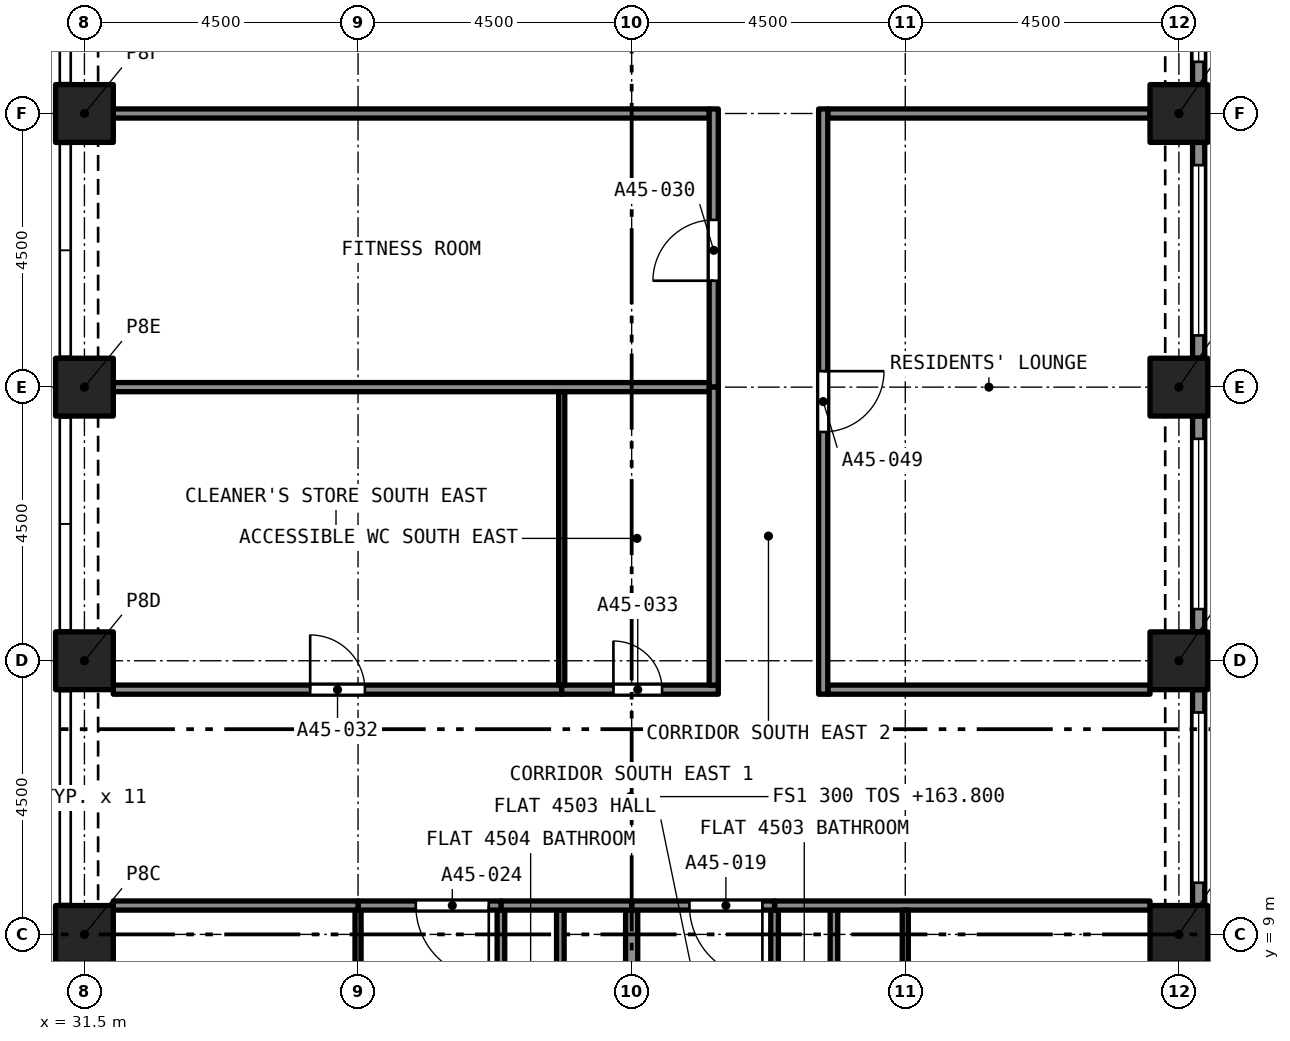
"""IFC4 building model, lengths in metres.
Left out: names, types, materials, properties, quantities, classifications, styles, units other than length and angle.
Written with IfcOpenShell. Run it as: python <this file> out.ifc"""

import sys

from ifc_helpers import new_model, si_unit, direction, frame, frame_2d, origin, origin_2d, place, context, subcontext, project, spatial, rectangle, extrude, element, fill, save


model = new_model("IFC4")
c1 = context("Model", 3, precision=1e-05, world=origin(), true_north=direction((0.0, 1.0)))
c2 = subcontext(c1, "Body", "Model", "MODEL_VIEW")
j1 = project(units=[si_unit("LENGTHUNIT", "METRE"), si_unit("PLANEANGLEUNIT", "RADIAN")], contexts=[c1])
p1 = place(None, origin())
s1 = spatial("IfcSite", under=j1, at=p1, CompositionType="ELEMENT")
p2 = place(p1, origin())
s2 = spatial("IfcBuilding", under=s1, at=p2, CompositionType="ELEMENT")
p3 = place(p2, frame((0.0, 0.0, 163.8)))
s3 = spatial("IfcBuildingStorey", under=s2, at=p3, CompositionType="ELEMENT", Elevation=163.8)
for number, where, z_axis, x_axis in (
    (1, (31.5, 9.0, 0.0), (0.0, 0.0, 1.0), (1.0, 0.0, 0.0)),
    (2, (49.5, 9.0, 0.0), (0.0, 0.0, 1.0), (1.0, 0.0, 0.0)),
    (3, (31.5, 13.5, 0.0), (0.0, 0.0, 1.0), (1.0, 0.0, 0.0)),
    (4, (49.5, 13.5, 0.0), (0.0, 0.0, 1.0), (1.0, 0.0, 0.0)),
    (5, (31.5, 18.0, 0.0), (0.0, 0.0, 1.0), (1.0, 0.0, 0.0)),
    (6, (49.5, 18.0, 0.0), (0.0, 0.0, 1.0), (1.0, 0.0, 0.0)),
    (7, (31.5, 22.5, 0.0), (0.0, 0.0, 1.0), (1.0, 0.0, 0.0)),
    (8, (49.5, 22.5, 0.0), (0.0, 0.0, 1.0), (1.0, 0.0, 0.0)),
):
    element("IfcColumn", number, at=place(p3, frame(where, z_axis=z_axis, x_axis=x_axis)), inside=s3, PredefinedType="COLUMN", context=c2, shape_type="SweptSolid", body=[
        extrude(rectangle(XDim=0.95, YDim=0.95, at=origin_2d()), origin(), (0.0, 0.0, 1.0), 4.4),
    ])
p4 = place(p3, frame((49.825, 13.025, 0.0), z_axis=(0.0, 0.0, 1.0), x_axis=(0.0, -1.0, 0.0)))
e9 = element("IfcWall", 9, at=p4, inside=s3, PredefinedType="SOLIDWALL", context=c2, shape_type="SweptSolid", body=[
    extrude(rectangle(XDim=3.55, YDim=0.2, at=frame_2d((1.775, 0.0))), origin(), (0.0, 0.0, 1.0), 4.4),
])
p5 = place(p4, frame((0.375, 0.0, 0.45)))
e10 = element("IfcOpeningElement", 10, at=p5, cuts=e9, PredefinedType="OPENING", context=c2, shape_type="SweptSolid", body=[
    extrude(rectangle(XDim=2.8, YDim=2.55, at=frame_2d((1.4, 1.275))), frame((0.0, 0.11, 0.0), z_axis=(0.0, -1.0, 0.0), x_axis=(1.0, 0.0, 0.0)), (0.0, 0.0, 1.0), 0.22),
])
p6 = place(p3, frame((49.825, 17.525, 0.0), z_axis=(0.0, 0.0, 1.0), x_axis=(0.0, -1.0, 0.0)))
e11 = element("IfcWall", 11, at=p6, inside=s3, PredefinedType="SOLIDWALL", context=c2, shape_type="SweptSolid", body=[
    extrude(rectangle(XDim=3.55, YDim=0.2, at=frame_2d((1.775, 0.0))), origin(), (0.0, 0.0, 1.0), 4.4),
])
p7 = place(p6, frame((0.375, 0.0, 0.45)))
e12 = element("IfcOpeningElement", 12, at=p7, cuts=e11, PredefinedType="OPENING", context=c2, shape_type="SweptSolid", body=[
    extrude(rectangle(XDim=2.8, YDim=2.55, at=frame_2d((1.4, 1.275))), frame((0.0, 0.11, 0.0), z_axis=(0.0, -1.0, 0.0), x_axis=(1.0, 0.0, 0.0)), (0.0, 0.0, 1.0), 0.22),
])
p8 = place(p3, frame((49.825, 22.025, 0.0), z_axis=(0.0, 0.0, 1.0), x_axis=(0.0, -1.0, 0.0)))
e13 = element("IfcWall", 13, at=p8, inside=s3, PredefinedType="SOLIDWALL", context=c2, shape_type="SweptSolid", body=[
    extrude(rectangle(XDim=3.55, YDim=0.2, at=frame_2d((1.775, 0.0))), origin(), (0.0, 0.0, 1.0), 4.4),
])
p9 = place(p8, frame((0.375, 0.0, 0.45)))
e14 = element("IfcOpeningElement", 14, at=p9, cuts=e13, PredefinedType="OPENING", context=c2, shape_type="SweptSolid", body=[
    extrude(rectangle(XDim=2.8, YDim=2.55, at=frame_2d((1.4, 1.275))), frame((0.0, 0.11, 0.0), z_axis=(0.0, -1.0, 0.0), x_axis=(1.0, 0.0, 0.0)), (0.0, 0.0, 1.0), 0.22),
])
p10 = place(p3, frame((49.825, 26.525, 0.0), z_axis=(0.0, 0.0, 1.0), x_axis=(0.0, -1.0, 0.0)))
e15 = element("IfcWall", 15, at=p10, inside=s3, PredefinedType="SOLIDWALL", context=c2, shape_type="SweptSolid", body=[
    extrude(rectangle(XDim=3.55, YDim=0.2, at=frame_2d((1.775, 0.0))), origin(), (0.0, 0.0, 1.0), 4.4),
])
p11 = place(p10, frame((0.375, 0.0, 0.45)))
e16 = element("IfcOpeningElement", 16, at=p11, cuts=e15, PredefinedType="OPENING", context=c2, shape_type="SweptSolid", body=[
    extrude(rectangle(XDim=2.8, YDim=2.55, at=frame_2d((1.4, 1.275))), frame((0.0, 0.11, 0.0), z_axis=(0.0, -1.0, 0.0), x_axis=(1.0, 0.0, 0.0)), (0.0, 0.0, 1.0), 0.22),
])
p12 = place(p3, frame((42.85, 9.4, 0.0), z_axis=(0.0, 0.0, 1.0), x_axis=(0.0, -1.0, 0.0)))
e17 = element("IfcWall", 17, at=p12, inside=s3, PredefinedType="PARTITIONING", context=c2, shape_type="SweptSolid", body=[
    extrude(rectangle(XDim=3.967, YDim=0.125, at=frame_2d((1.984, 0.0))), origin(), (0.0, 0.0, 1.0), 4.1),
])
p13 = place(p12, frame((2.985, 0.0, 0.0)))
e18 = element("IfcOpeningElement", 18, at=p13, cuts=e17, PredefinedType="OPENING", context=c2, shape_type="SweptSolid", body=[
    extrude(rectangle(XDim=0.8, YDim=2.1, at=frame_2d((0.4, 1.05))), frame((0.0, 0.073, 0.0), z_axis=(0.0, -1.0, 0.0), x_axis=(1.0, 0.0, 0.0)), (0.0, 0.0, 1.0), 0.145),
])
p14 = place(p3, frame((43.827, 5.558, 0.0), z_axis=(0.0, 0.0, 1.0), x_axis=(0.0, 1.0, 0.0)))
e19 = element("IfcWall", 19, at=p14, inside=s3, PredefinedType="PARTITIONING", context=c2, shape_type="SweptSolid", body=[
    extrude(rectangle(XDim=3.842, YDim=0.125, at=frame_2d((1.921, 0.0))), origin(), (0.0, 0.0, 1.0), 4.1),
])
p15 = place(p3, frame((42.85, 9.475, 0.0), z_axis=(0.0, 0.0, 1.0), x_axis=(1.0, 0.0, 0.0)))
e20 = element("IfcWall", 20, at=p15, inside=s3, PredefinedType="PARTITIONING", context=c2, shape_type="SweptSolid", body=[
    extrude(rectangle(XDim=6.175, YDim=0.15, at=frame_2d((3.087, 0.0))), origin(), (0.0, 0.0, 1.0), 4.1),
])
p16 = place(p3, frame((40.5, 4.025, 0.0), z_axis=(0.0, 0.0, 1.0), x_axis=(0.0, 1.0, 0.0)))
e21 = element("IfcWall", 21, at=p16, inside=s3, PredefinedType="PARTITIONING", context=c2, shape_type="SweptSolid", body=[
    extrude(rectangle(XDim=5.375, YDim=0.2, at=frame_2d((2.688, 0.0))), origin(), (0.0, 0.0, 1.0), 4.1),
])
p17 = place(p3, frame((42.85, 9.475, 0.0), z_axis=(0.0, 0.0, 1.0), x_axis=(-1.0, 0.0, 0.0)))
e22 = element("IfcWall", 22, at=p17, inside=s3, PredefinedType="PARTITIONING", context=c2, shape_type="SweptSolid", body=[
    extrude(rectangle(XDim=2.35, YDim=0.15, at=frame_2d((1.175, 0.0))), origin(), (0.0, 0.0, 1.0), 4.1),
])
p18 = place(p17, frame((0.2, 0.0, 0.0)))
e23 = element("IfcOpeningElement", 23, at=p18, cuts=e22, PredefinedType="OPENING", context=c2, shape_type="SweptSolid", body=[
    extrude(rectangle(XDim=1.2, YDim=2.4, at=frame_2d((0.6, 1.2))), frame((0.0, 0.085, 0.0), z_axis=(0.0, -1.0, 0.0), x_axis=(1.0, 0.0, 0.0)), (0.0, 0.0, 1.0), 0.17),
])
p19 = place(p3, frame((45.0, 5.495, 0.0), z_axis=(0.0, 0.0, 1.0), x_axis=(0.0, 1.0, 0.0)))
e24 = element("IfcWall", 24, at=p19, inside=s3, PredefinedType="PARTITIONING", context=c2, shape_type="SweptSolid", body=[
    extrude(rectangle(XDim=3.905, YDim=0.1, at=frame_2d((1.952, 0.0))), origin(), (0.0, 0.0, 1.0), 4.1),
])
p20 = place(p3, frame((38.35, 9.4, 0.0), z_axis=(0.0, 0.0, 1.0), x_axis=(0.0, -1.0, 0.0)))
e25 = element("IfcWall", 25, at=p20, inside=s3, PredefinedType="PARTITIONING", context=c2, shape_type="SweptSolid", body=[
    extrude(rectangle(XDim=4.327, YDim=0.125, at=frame_2d((2.164, 0.0))), origin(), (0.0, 0.0, 1.0), 4.1),
])
p21 = place(p20, frame((3.345, 0.0, 0.0)))
e26 = element("IfcOpeningElement", 26, at=p21, cuts=e25, PredefinedType="OPENING", context=c2, shape_type="SweptSolid", body=[
    extrude(rectangle(XDim=0.8, YDim=2.1, at=frame_2d((0.4, 1.05))), frame((0.0, 0.073, 0.0), z_axis=(0.0, -1.0, 0.0), x_axis=(1.0, 0.0, 0.0)), (0.0, 0.0, 1.0), 0.145),
])
p22 = place(p3, frame((39.327, 5.198, 0.0), z_axis=(0.0, 0.0, 1.0), x_axis=(0.0, 1.0, 0.0)))
e27 = element("IfcWall", 27, at=p22, inside=s3, PredefinedType="PARTITIONING", context=c2, shape_type="SweptSolid", body=[
    extrude(rectangle(XDim=4.202, YDim=0.125, at=frame_2d((2.101, 0.0))), origin(), (0.0, 0.0, 1.0), 4.1),
])
p23 = place(p3, frame((38.35, 9.475, 0.0), z_axis=(0.0, 0.0, 1.0), x_axis=(1.0, 0.0, 0.0)))
e28 = element("IfcWall", 28, at=p23, inside=s3, PredefinedType="PARTITIONING", context=c2, shape_type="SweptSolid", body=[
    extrude(rectangle(XDim=2.15, YDim=0.15, at=frame_2d((1.075, 0.0))), origin(), (0.0, 0.0, 1.0), 4.1),
])
p24 = place(p3, frame((36.0, 3.835, 0.0), z_axis=(0.0, 0.0, 1.0), x_axis=(0.0, 1.0, 0.0)))
e29 = element("IfcWall", 29, at=p24, inside=s3, PredefinedType="PARTITIONING", context=c2, shape_type="SweptSolid", body=[
    extrude(rectangle(XDim=5.565, YDim=0.1, at=frame_2d((2.782, 0.0))), origin(), (0.0, 0.0, 1.0), 4.1),
])
p25 = place(p24, frame((0.15, 0.0, 0.0)))
e30 = element("IfcOpeningElement", 30, at=p25, cuts=e29, PredefinedType="OPENING", context=c2, shape_type="SweptSolid", body=[
    extrude(rectangle(XDim=1.0, YDim=2.1, at=frame_2d((0.5, 1.05))), frame((0.0, 0.06, 0.0), z_axis=(0.0, -1.0, 0.0), x_axis=(1.0, 0.0, 0.0)), (0.0, 0.0, 1.0), 0.12),
])
p26 = place(p3, frame((38.35, 9.475, 0.0), z_axis=(0.0, 0.0, 1.0), x_axis=(-1.0, 0.0, 0.0)))
e31 = element("IfcWall", 31, at=p26, inside=s3, PredefinedType="PARTITIONING", context=c2, shape_type="SweptSolid", body=[
    extrude(rectangle(XDim=2.35, YDim=0.15, at=frame_2d((1.175, 0.0))), origin(), (0.0, 0.0, 1.0), 4.1),
])
p27 = place(p26, frame((0.2, 0.0, 0.0)))
e32 = element("IfcOpeningElement", 32, at=p27, cuts=e31, PredefinedType="OPENING", context=c2, shape_type="SweptSolid", body=[
    extrude(rectangle(XDim=1.2, YDim=2.4, at=frame_2d((0.6, 1.2))), frame((0.0, 0.085, 0.0), z_axis=(0.0, -1.0, 0.0), x_axis=(1.0, 0.0, 0.0)), (0.0, 0.0, 1.0), 0.17),
])
p28 = place(p3, frame((31.975, 9.475, 0.0), z_axis=(0.0, 0.0, 1.0), x_axis=(1.0, 0.0, 0.0)))
e33 = element("IfcWall", 33, at=p28, inside=s3, PredefinedType="PARTITIONING", context=c2, shape_type="SweptSolid", body=[
    extrude(rectangle(XDim=4.025, YDim=0.15, at=frame_2d((2.012, 0.0))), origin(), (0.0, 0.0, 1.0), 4.1),
])
p29 = place(p3, frame((31.975, 22.5, 0.0), z_axis=(0.0, 0.0, 1.0), x_axis=(1.0, 0.0, 0.0)))
e34 = element("IfcWall", 34, at=p29, inside=s3, PredefinedType="PARTITIONING", context=c2, shape_type="SweptSolid", body=[
    extrude(rectangle(XDim=9.8, YDim=0.15, at=frame_2d((4.9, 0.0))), origin(), (0.0, 0.0, 1.0), 4.1),
])
p30 = place(p3, frame((41.85, 18.0, 0.0), z_axis=(0.0, 0.0, 1.0), x_axis=(0.0, 1.0, 0.0)))
e35 = element("IfcWall", 35, at=p30, inside=s3, PredefinedType="PARTITIONING", context=c2, shape_type="SweptSolid", body=[
    extrude(rectangle(XDim=4.575, YDim=0.15, at=frame_2d((2.288, 0.0))), origin(), (0.0, 0.0, 1.0), 4.1),
])
p31 = place(p30, frame((1.75, 0.0, 0.0)))
e36 = element("IfcOpeningElement", 36, at=p31, cuts=e35, PredefinedType="OPENING", context=c2, shape_type="SweptSolid", body=[
    extrude(rectangle(XDim=1.0, YDim=2.1, at=frame_2d((0.5, 1.05))), frame((0.0, 0.085, 0.0), z_axis=(0.0, -1.0, 0.0), x_axis=(1.0, 0.0, 0.0)), (0.0, 0.0, 1.0), 0.17),
])
p32 = place(p3, frame((31.975, 18.0, 0.0), z_axis=(0.0, 0.0, 1.0), x_axis=(1.0, 0.0, 0.0)))
e37 = element("IfcWall", 37, at=p32, inside=s3, PredefinedType="PARTITIONING", context=c2, shape_type="SweptSolid", body=[
    extrude(rectangle(XDim=9.8, YDim=0.15, at=frame_2d((4.9, 0.0))), origin(), (0.0, 0.0, 1.0), 4.1),
])
p33 = place(p3, frame((31.975, 13.025, 0.0), z_axis=(0.0, 0.0, 1.0), x_axis=(1.0, 0.0, 0.0)))
e38 = element("IfcWall", 38, at=p33, inside=s3, PredefinedType="PARTITIONING", context=c2, shape_type="SweptSolid", body=[
    extrude(rectangle(XDim=7.375, YDim=0.15, at=frame_2d((3.688, 0.0))), origin(), (0.0, 0.0, 1.0), 4.1),
])
p34 = place(p33, frame((3.238, 0.0, 0.0)))
e39 = element("IfcOpeningElement", 39, at=p34, cuts=e38, PredefinedType="OPENING", context=c2, shape_type="SweptSolid", body=[
    extrude(rectangle(XDim=0.9, YDim=2.1, at=frame_2d((0.45, 1.05))), frame((0.0, 0.085, 0.0), z_axis=(0.0, -1.0, 0.0), x_axis=(1.0, 0.0, 0.0)), (0.0, 0.0, 1.0), 0.17),
])
p35 = place(p3, frame((39.35, 13.025, 0.0), z_axis=(0.0, 0.0, 1.0), x_axis=(1.0, 0.0, 0.0)))
e40 = element("IfcWall", 40, at=p35, inside=s3, PredefinedType="PARTITIONING", context=c2, shape_type="SweptSolid", body=[
    extrude(rectangle(XDim=2.575, YDim=0.15, at=frame_2d((1.288, 0.0))), origin(), (0.0, 0.0, 1.0), 4.1),
])
p36 = place(p35, frame((0.85, 0.0, 0.0)))
e41 = element("IfcOpeningElement", 41, at=p36, cuts=e40, PredefinedType="OPENING", context=c2, shape_type="SweptSolid", body=[
    extrude(rectangle(XDim=0.8, YDim=2.1, at=frame_2d((0.4, 1.05))), frame((0.0, 0.085, 0.0), z_axis=(0.0, -1.0, 0.0), x_axis=(1.0, 0.0, 0.0)), (0.0, 0.0, 1.0), 0.17),
])
for number, where, z_axis, x_axis in (
    (42, (43.725, 13.025, 0.0), (0.0, 0.0, 1.0), (1.0, 0.0, 0.0)),
    (43, (43.725, 22.5, 0.0), (0.0, 0.0, 1.0), (1.0, 0.0, 0.0)),
):
    element("IfcWall", number, at=place(p3, frame(where, z_axis=z_axis, x_axis=x_axis)), inside=s3, PredefinedType="PARTITIONING", context=c2, shape_type="SweptSolid", body=[
        extrude(rectangle(XDim=5.3, YDim=0.15, at=frame_2d((2.65, 0.0))), origin(), (0.0, 0.0, 1.0), 4.1),
    ])
p37 = place(p3, frame((41.85, 13.1, 0.0), z_axis=(0.0, 0.0, 1.0), x_axis=(0.0, 1.0, 0.0)))
e44 = element("IfcWall", 44, at=p37, inside=s3, PredefinedType="PARTITIONING", context=c2, shape_type="SweptSolid", body=[
    extrude(rectangle(XDim=4.9, YDim=0.15, at=frame_2d((2.45, 0.0))), origin(), (0.0, 0.0, 1.0), 4.1),
])
p38 = place(p3, frame((43.65, 22.575, 0.0), z_axis=(0.0, 0.0, 1.0), x_axis=(0.0, -1.0, 0.0)))
e45 = element("IfcWall", 45, at=p38, inside=s3, PredefinedType="PARTITIONING", context=c2, shape_type="SweptSolid", body=[
    extrude(rectangle(XDim=9.625, YDim=0.15, at=frame_2d((4.812, 0.0))), origin(), (0.0, 0.0, 1.0), 4.1),
])
p39 = place(p38, frame((4.312, 0.0, 0.0)))
e46 = element("IfcOpeningElement", 46, at=p39, cuts=e45, PredefinedType="OPENING", context=c2, shape_type="SweptSolid", body=[
    extrude(rectangle(XDim=1.0, YDim=2.1, at=frame_2d((0.5, 1.05))), frame((0.0, 0.085, 0.0), z_axis=(0.0, -1.0, 0.0), x_axis=(1.0, 0.0, 0.0)), (0.0, 0.0, 1.0), 0.17),
])
p40 = place(p3, frame((39.35, 13.1, 0.0), z_axis=(0.0, 0.0, 1.0), x_axis=(0.0, 1.0, 0.0)))
e47 = element("IfcWall", 47, at=p40, inside=s3, PredefinedType="PARTITIONING", context=c2, shape_type="SweptSolid", body=[
    extrude(rectangle(XDim=4.825, YDim=0.1, at=frame_2d((2.413, 0.0))), origin(), (0.0, 0.0, 1.0), 4.1),
])
p41 = place(p5, origin())
e48 = element("IfcWindow", 48, at=p41, inside=s3, PartitioningType="SINGLE_PANEL", PredefinedType="WINDOW", context=c2, shape_type="SweptSolid", body=[
    extrude(rectangle(XDim=2.8, YDim=2.55, at=frame_2d((1.4, 1.275))), frame((0.0, 0.03, 0.0), z_axis=(0.0, -1.0, 0.0), x_axis=(1.0, 0.0, 0.0)), (0.0, 0.0, 1.0), 0.06),
])
fill(e10, e48)
p42 = place(p7, origin())
e49 = element("IfcWindow", 49, at=p42, inside=s3, PartitioningType="SINGLE_PANEL", PredefinedType="WINDOW", context=c2, shape_type="SweptSolid", body=[
    extrude(rectangle(XDim=2.8, YDim=2.55, at=frame_2d((1.4, 1.275))), frame((0.0, 0.03, 0.0), z_axis=(0.0, -1.0, 0.0), x_axis=(1.0, 0.0, 0.0)), (0.0, 0.0, 1.0), 0.06),
])
fill(e12, e49)
p43 = place(p9, origin())
e50 = element("IfcWindow", 50, at=p43, inside=s3, PartitioningType="SINGLE_PANEL", PredefinedType="WINDOW", context=c2, shape_type="SweptSolid", body=[
    extrude(rectangle(XDim=2.8, YDim=2.55, at=frame_2d((1.4, 1.275))), frame((0.0, 0.03, 0.0), z_axis=(0.0, -1.0, 0.0), x_axis=(1.0, 0.0, 0.0)), (0.0, 0.0, 1.0), 0.06),
])
fill(e14, e50)
p44 = place(p11, origin())
e51 = element("IfcWindow", 51, at=p44, inside=s3, PartitioningType="SINGLE_PANEL", PredefinedType="WINDOW", context=c2, shape_type="SweptSolid", body=[
    extrude(rectangle(XDim=2.8, YDim=2.55, at=frame_2d((1.4, 1.275))), frame((0.0, 0.03, 0.0), z_axis=(0.0, -1.0, 0.0), x_axis=(1.0, 0.0, 0.0)), (0.0, 0.0, 1.0), 0.06),
])
fill(e16, e51)
p45 = place(p18, origin())
e52 = element("IfcDoor", 52, at=p45, inside=s3, OperationType="SINGLE_SWING_LEFT", PredefinedType="DOOR", context=c2, shape_type="SweptSolid", body=[
    extrude(rectangle(XDim=1.2, YDim=2.4, at=frame_2d((0.6, 1.2))), frame((0.0, 0.025, 0.0), z_axis=(0.0, -1.0, 0.0), x_axis=(1.0, 0.0, 0.0)), (0.0, 0.0, 1.0), 0.05),
])
fill(e23, e52)
p46 = place(p27, origin())
e53 = element("IfcDoor", 53, at=p46, inside=s3, OperationType="SINGLE_SWING_LEFT", PredefinedType="DOOR", context=c2, shape_type="SweptSolid", body=[
    extrude(rectangle(XDim=1.2, YDim=2.4, at=frame_2d((0.6, 1.2))), frame((0.0, 0.025, 0.0), z_axis=(0.0, -1.0, 0.0), x_axis=(1.0, 0.0, 0.0)), (0.0, 0.0, 1.0), 0.05),
])
fill(e32, e53)
p47 = place(p31, origin())
e54 = element("IfcDoor", 54, at=p47, inside=s3, OperationType="SINGLE_SWING_LEFT", PredefinedType="DOOR", context=c2, shape_type="SweptSolid", body=[
    extrude(rectangle(XDim=1.0, YDim=2.1, at=frame_2d((0.5, 1.05))), frame((0.0, 0.025, 0.0), z_axis=(0.0, -1.0, 0.0), x_axis=(1.0, 0.0, 0.0)), (0.0, 0.0, 1.0), 0.05),
])
fill(e36, e54)
p48 = place(p34, origin())
e55 = element("IfcDoor", 55, at=p48, inside=s3, OperationType="SINGLE_SWING_LEFT", PredefinedType="DOOR", context=c2, shape_type="SweptSolid", body=[
    extrude(rectangle(XDim=0.9, YDim=2.1, at=frame_2d((0.45, 1.05))), frame((0.0, 0.025, 0.0), z_axis=(0.0, -1.0, 0.0), x_axis=(1.0, 0.0, 0.0)), (0.0, 0.0, 1.0), 0.05),
])
fill(e39, e55)
p49 = place(p36, origin())
e56 = element("IfcDoor", 56, at=p49, inside=s3, OperationType="SINGLE_SWING_LEFT", PredefinedType="DOOR", context=c2, shape_type="SweptSolid", body=[
    extrude(rectangle(XDim=0.8, YDim=2.1, at=frame_2d((0.4, 1.05))), frame((0.0, 0.025, 0.0), z_axis=(0.0, -1.0, 0.0), x_axis=(1.0, 0.0, 0.0)), (0.0, 0.0, 1.0), 0.05),
])
fill(e41, e56)
p50 = place(p39, origin())
e57 = element("IfcDoor", 57, at=p50, inside=s3, OperationType="SINGLE_SWING_RIGHT", PredefinedType="DOOR", context=c2, shape_type="SweptSolid", body=[
    extrude(rectangle(XDim=1.0, YDim=2.1, at=frame_2d((0.5, 1.05))), frame((0.0, 0.025, 0.0), z_axis=(0.0, -1.0, 0.0), x_axis=(1.0, 0.0, 0.0)), (0.0, 0.0, 1.0), 0.05),
])
fill(e46, e57)
save(model, sys.argv[1])
